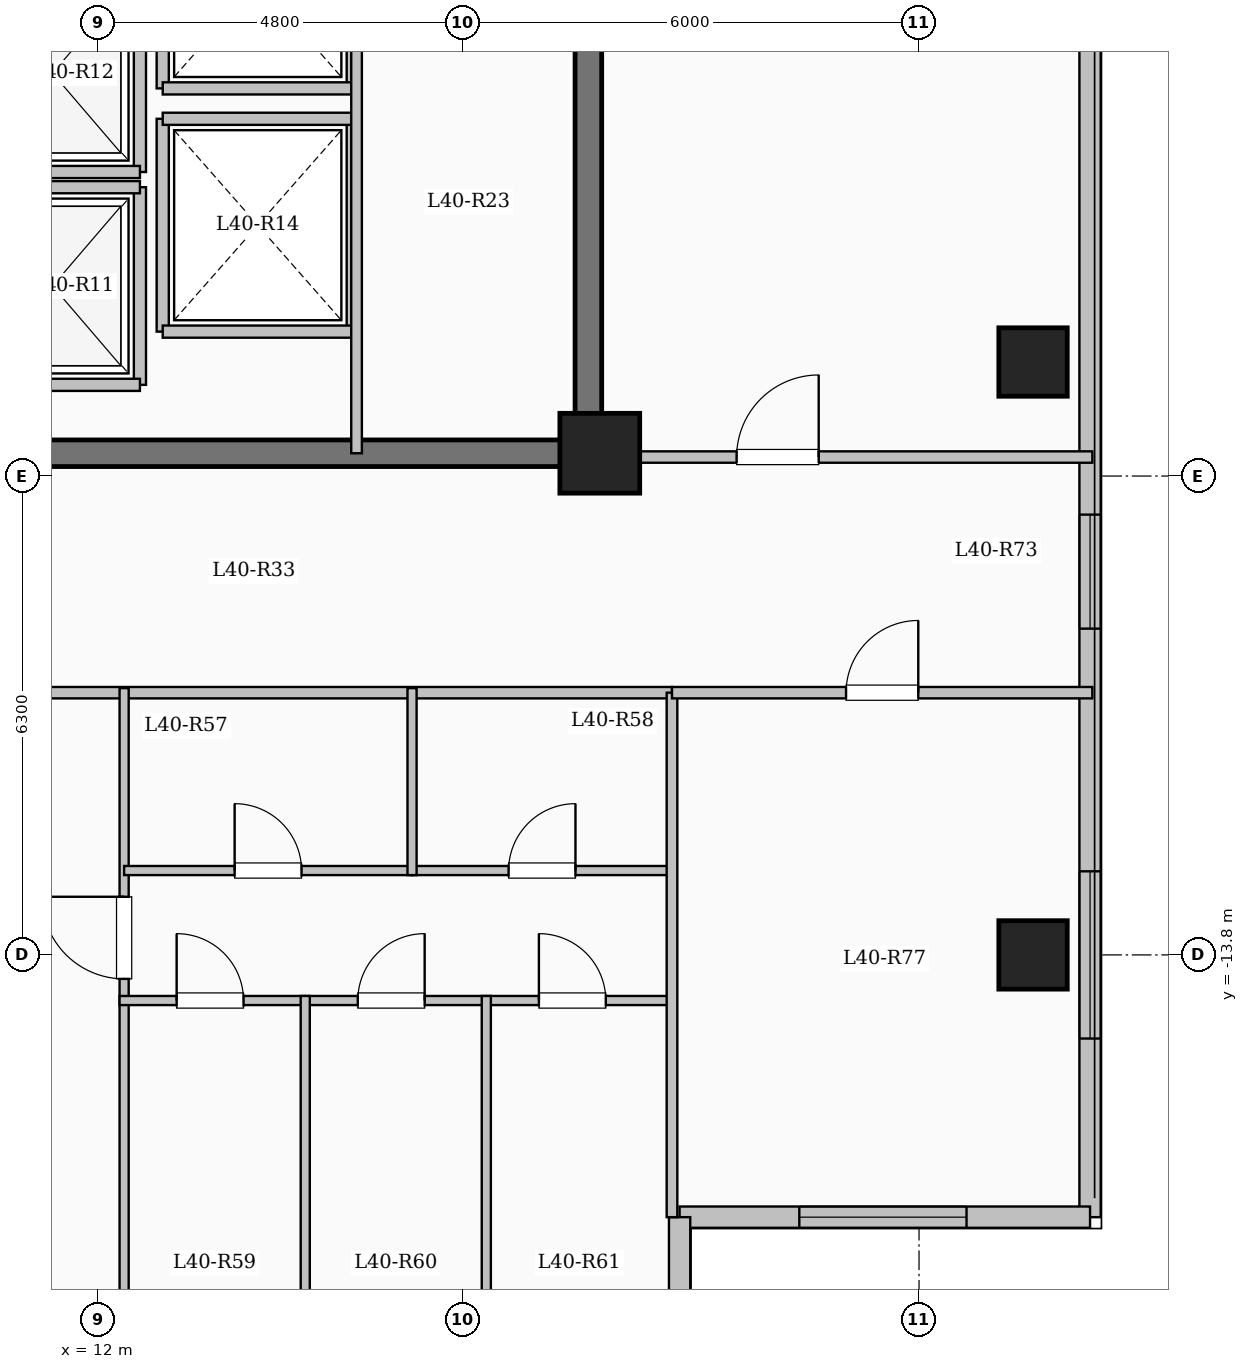
"""IFC4 building model, lengths in metres.
Left out: names, types, materials, properties, quantities, classifications, styles, units other than length and angle.
Written with IfcOpenShell. Run it as: python <this file> out.ifc"""

import sys

from ifc_helpers import new_model, si_unit, direction, frame, frame_2d, origin, origin_2d, place, context, subcontext, project, spatial, rectangle, extrude, element, fill, save


model = new_model("IFC4")
c1 = context("Model", 3, precision=1e-05, world=origin(), true_north=direction((0.0, 1.0)))
c2 = subcontext(c1, "Body", "Model", "MODEL_VIEW")
j1 = project(units=[si_unit("LENGTHUNIT", "METRE"), si_unit("PLANEANGLEUNIT", "RADIAN")], contexts=[c1])
p1 = place(None, origin())
s1 = spatial("IfcSite", under=j1, at=p1, CompositionType="ELEMENT")
p2 = place(p1, origin())
s2 = spatial("IfcBuilding", under=s1, at=p2, CompositionType="ELEMENT")
p3 = place(p2, frame((0.0, 0.0, 149.35)))
s3 = spatial("IfcBuildingStorey", under=s2, at=p3, CompositionType="ELEMENT", Elevation=149.35)
p4 = place(p3, frame((18.6, -7.2, 0.0), z_axis=(0.0, 0.0, 1.0), x_axis=(1.0, 0.0, 0.0)))
e1 = element("IfcColumn", 1, at=p4, inside=s3, PredefinedType="COLUMN", context=c2, shape_type="SweptSolid", body=[
    extrude(rectangle(XDim=1.05, YDim=1.05, at=origin_2d()), origin(), (0.0, 0.0, 1.0), 3.35),
])
for number, where, z_axis, x_axis in (
    (2, (24.3, -13.8, 0.0), (0.0, 0.0, 1.0), (1.0, 0.0, 0.0)),
    (3, (24.3, -6.0, 0.0), (0.0, 0.0, 1.0), (1.0, 0.0, 0.0)),
):
    element("IfcColumn", number, at=place(p3, frame(where, z_axis=z_axis, x_axis=x_axis)), inside=s3, PredefinedType="COLUMN", context=c2, shape_type="SweptSolid", body=[
        extrude(rectangle(XDim=0.9, YDim=0.9, at=origin_2d()), origin(), (0.0, 0.0, 1.0), 3.35),
    ])
p5 = place(p3, frame((25.05, 17.25, 0.0), z_axis=(0.0, 0.0, 1.0), x_axis=(0.0, -1.0, 0.0)))
e4 = element("IfcWall", 4, at=p5, inside=s3, PredefinedType="SOLIDWALL", context=c2, shape_type="SweptSolid", body=[
    extrude(rectangle(XDim=34.5, YDim=0.28, at=frame_2d((17.25, 0.0))), origin(), (0.0, 0.0, 1.0), 3.1),
])
p6 = place(p5, frame((1.375, 0.0, 0.9)))
e5 = element("IfcOpeningElement", 5, at=p6, cuts=e4, PredefinedType="OPENING", context=c2, shape_type="SweptSolid", body=[
    extrude(rectangle(XDim=2.0, YDim=1.7, at=frame_2d((1.0, 0.85))), frame((0.0, 0.15, 0.0), z_axis=(0.0, -1.0, 0.0), x_axis=(1.0, 0.0, 0.0)), (0.0, 0.0, 1.0), 0.3),
])
p7 = place(p5, frame((5.125, 0.0, 0.95)))
e6 = element("IfcOpeningElement", 6, at=p7, cuts=e4, PredefinedType="OPENING", context=c2, shape_type="SweptSolid", body=[
    extrude(rectangle(XDim=1.0, YDim=1.5, at=frame_2d((0.5, 0.75))), frame((0.0, 0.15, 0.0), z_axis=(0.0, -1.0, 0.0), x_axis=(1.0, 0.0, 0.0)), (0.0, 0.0, 1.0), 0.3),
])
p8 = place(p5, frame((14.5, 0.0, 0.9)))
e7 = element("IfcOpeningElement", 7, at=p8, cuts=e4, PredefinedType="OPENING", context=c2, shape_type="SweptSolid", body=[
    extrude(rectangle(XDim=2.0, YDim=1.7, at=frame_2d((1.0, 0.85))), frame((0.0, 0.15, 0.0), z_axis=(0.0, -1.0, 0.0), x_axis=(1.0, 0.0, 0.0)), (0.0, 0.0, 1.0), 0.3),
])
p9 = place(p5, frame((25.258, 0.0, 0.9)))
e8 = element("IfcOpeningElement", 8, at=p9, cuts=e4, PredefinedType="OPENING", context=c2, shape_type="SweptSolid", body=[
    extrude(rectangle(XDim=1.5, YDim=1.65, at=frame_2d((0.75, 0.825))), frame((0.0, 0.15, 0.0), z_axis=(0.0, -1.0, 0.0), x_axis=(1.0, 0.0, 0.0)), (0.0, 0.0, 1.0), 0.3),
])
p10 = place(p5, frame((29.95, 0.0, 0.9)))
e9 = element("IfcOpeningElement", 9, at=p10, cuts=e4, PredefinedType="OPENING", context=c2, shape_type="SweptSolid", body=[
    extrude(rectangle(XDim=2.2, YDim=1.75, at=frame_2d((1.1, 0.875))), frame((0.0, 0.15, 0.0), z_axis=(0.0, -1.0, 0.0), x_axis=(1.0, 0.0, 0.0)), (0.0, 0.0, 1.0), 0.3),
])
p11 = place(p3, frame((25.05, -17.25, 0.0), z_axis=(0.0, 0.0, 1.0), x_axis=(-1.0, 0.0, 0.0)))
e10 = element("IfcWall", 10, at=p11, inside=s3, PredefinedType="SOLIDWALL", context=c2, shape_type="SweptSolid", body=[
    extrude(rectangle(XDim=5.4, YDim=0.28, at=frame_2d((2.7, 0.0))), origin(), (0.0, 0.0, 1.0), 3.1),
])
p12 = place(p11, frame((1.625, 0.0, 0.9)))
e11 = element("IfcOpeningElement", 11, at=p12, cuts=e10, PredefinedType="OPENING", context=c2, shape_type="SweptSolid", body=[
    extrude(rectangle(XDim=2.2, YDim=1.75, at=frame_2d((1.1, 0.875))), frame((0.0, 0.15, 0.0), z_axis=(0.0, -1.0, 0.0), x_axis=(1.0, 0.0, 0.0)), (0.0, 0.0, 1.0), 0.3),
])
p13 = place(p3, frame((19.65, -17.25, 0.0), z_axis=(0.0, 0.0, 1.0), x_axis=(0.0, -1.0, 0.0)))
e12 = element("IfcWall", 12, at=p13, inside=s3, PredefinedType="SOLIDWALL", context=c2, shape_type="SweptSolid", body=[
    extrude(rectangle(XDim=3.9, YDim=0.28, at=frame_2d((1.95, 0.0))), origin(), (0.0, 0.0, 1.0), 3.1),
])
p14 = place(p13, frame((1.107, 0.0, 0.9)))
e13 = element("IfcOpeningElement", 13, at=p14, cuts=e12, PredefinedType="OPENING", context=c2, shape_type="SweptSolid", body=[
    extrude(rectangle(XDim=1.65, YDim=1.6, at=frame_2d((0.825, 0.8))), frame((0.0, 0.15, 0.0), z_axis=(0.0, -1.0, 0.0), x_axis=(1.0, 0.0, 0.0)), (0.0, 0.0, 1.0), 0.3),
])
p15 = place(p3, frame((12.55, -6.3, 0.0), z_axis=(0.0, 0.0, 1.0), x_axis=(0.0, 1.0, 0.0)))
e14 = element("IfcWall", 14, at=p15, inside=s3, PredefinedType="SOLIDWALL", context=c2, shape_type="SweptSolid", body=[
    extrude(rectangle(XDim=2.6, YDim=0.16, at=frame_2d((1.3, 0.0))), origin(), (0.0, 0.0, 1.0), 3.1),
])
for number, where, z_axis, x_axis in (
    (15, (10.25, -6.3, 0.0), (0.0, 0.0, 1.0), (1.0, 0.0, 0.0)),
    (16, (10.25, -3.7, 0.0), (0.0, 0.0, 1.0), (1.0, 0.0, 0.0)),
):
    element("IfcWall", number, at=place(p3, frame(where, z_axis=z_axis, x_axis=x_axis)), inside=s3, PredefinedType="SOLIDWALL", context=c2, shape_type="SweptSolid", body=[
        extrude(rectangle(XDim=2.3, YDim=0.16, at=frame_2d((1.15, 0.0))), origin(), (0.0, 0.0, 1.0), 3.1),
    ])
p16 = place(p3, frame((12.55, -3.5, 0.0), z_axis=(0.0, 0.0, 1.0), x_axis=(0.0, 1.0, 0.0)))
e17 = element("IfcWall", 17, at=p16, inside=s3, PredefinedType="SOLIDWALL", context=c2, shape_type="SweptSolid", body=[
    extrude(rectangle(XDim=2.6, YDim=0.16, at=frame_2d((1.3, 0.0))), origin(), (0.0, 0.0, 1.0), 3.1),
])
p17 = place(p3, frame((10.25, -3.5, 0.0), z_axis=(0.0, 0.0, 1.0), x_axis=(1.0, 0.0, 0.0)))
e18 = element("IfcWall", 18, at=p17, inside=s3, PredefinedType="SOLIDWALL", context=c2, shape_type="SweptSolid", body=[
    extrude(rectangle(XDim=2.3, YDim=0.16, at=frame_2d((1.15, 0.0))), origin(), (0.0, 0.0, 1.0), 3.1),
])
for number, where, z_axis, x_axis in (
    (19, (12.85, -5.6, 0.0), (0.0, 0.0, 1.0), (0.0, 1.0, 0.0)),
    (20, (15.35, -5.6, 0.0), (0.0, 0.0, 1.0), (0.0, 1.0, 0.0)),
):
    element("IfcWall", number, at=place(p3, frame(where, z_axis=z_axis, x_axis=x_axis)), inside=s3, PredefinedType="SOLIDWALL", context=c2, shape_type="SweptSolid", body=[
        extrude(rectangle(XDim=2.8, YDim=0.16, at=frame_2d((1.4, 0.0))), origin(), (0.0, 0.0, 1.0), 3.1),
    ])
for number, where, z_axis, x_axis in (
    (21, (12.85, -5.6, 0.0), (0.0, 0.0, 1.0), (1.0, 0.0, 0.0)),
    (22, (12.85, -2.8, 0.0), (0.0, 0.0, 1.0), (1.0, 0.0, 0.0)),
):
    element("IfcWall", number, at=place(p3, frame(where, z_axis=z_axis, x_axis=x_axis)), inside=s3, PredefinedType="SOLIDWALL", context=c2, shape_type="SweptSolid", body=[
        extrude(rectangle(XDim=2.5, YDim=0.16, at=frame_2d((1.25, 0.0))), origin(), (0.0, 0.0, 1.0), 3.1),
    ])
for number, where, z_axis, x_axis in (
    (23, (12.85, -2.4, 0.0), (0.0, 0.0, 1.0), (0.0, 1.0, 0.0)),
    (24, (15.35, -2.4, 0.0), (0.0, 0.0, 1.0), (0.0, 1.0, 0.0)),
):
    element("IfcWall", number, at=place(p3, frame(where, z_axis=z_axis, x_axis=x_axis)), inside=s3, PredefinedType="SOLIDWALL", context=c2, shape_type="SweptSolid", body=[
        extrude(rectangle(XDim=2.8, YDim=0.16, at=frame_2d((1.4, 0.0))), origin(), (0.0, 0.0, 1.0), 3.1),
    ])
p18 = place(p3, frame((12.85, -2.4, 0.0), z_axis=(0.0, 0.0, 1.0), x_axis=(1.0, 0.0, 0.0)))
e25 = element("IfcWall", 25, at=p18, inside=s3, PredefinedType="SOLIDWALL", context=c2, shape_type="SweptSolid", body=[
    extrude(rectangle(XDim=2.5, YDim=0.16, at=frame_2d((1.25, 0.0))), origin(), (0.0, 0.0, 1.0), 3.1),
])
p19 = place(p3, frame((18.45, -7.375, 0.0), z_axis=(0.0, 0.0, 1.0), x_axis=(0.0, 1.0, 0.0)))
e26 = element("IfcWall", 26, at=p19, inside=s3, PredefinedType="SHEAR", context=c2, shape_type="SweptSolid", body=[
    extrude(rectangle(XDim=14.05, YDim=0.35, at=frame_2d((7.025, 0.0))), origin(), (0.0, 0.0, 1.0), 3.35),
])
p20 = place(p3, frame((10.075, -7.2, 0.0), z_axis=(0.0, 0.0, 1.0), x_axis=(1.0, 0.0, 0.0)))
e27 = element("IfcWall", 27, at=p20, inside=s3, PredefinedType="SHEAR", context=c2, shape_type="SweptSolid", body=[
    extrude(rectangle(XDim=8.55, YDim=0.35, at=frame_2d((4.275, 0.0))), origin(), (0.0, 0.0, 1.0), 3.35),
])
p21 = place(p3, frame((15.4, -7.2, 0.0), z_axis=(0.0, 0.0, 1.0), x_axis=(0.0, 1.0, 0.0)))
e28 = element("IfcWall", 28, at=p21, inside=s3, PredefinedType="PARTITIONING", context=c2, shape_type="SweptSolid", body=[
    extrude(rectangle(XDim=10.45, YDim=0.14, at=frame_2d((5.225, 0.0))), origin(), (0.0, 0.0, 1.0), 3.1),
])
p22 = place(p21, frame((9.25, 0.0, 0.0)))
e29 = element("IfcOpeningElement", 29, at=p22, cuts=e28, PredefinedType="OPENING", context=c2, shape_type="SweptSolid", body=[
    extrude(rectangle(XDim=0.9, YDim=2.08, at=frame_2d((0.45, 1.04))), frame((0.0, 0.08, 0.0), z_axis=(0.0, -1.0, 0.0), x_axis=(1.0, 0.0, 0.0)), (0.0, 0.0, 1.0), 0.16),
])
p23 = place(p3, frame((8.55, -10.35, 0.0), z_axis=(0.0, 0.0, 1.0), x_axis=(1.0, 0.0, 0.0)))
e30 = element("IfcWall", 30, at=p23, inside=s3, PredefinedType="PARTITIONING", context=c2, shape_type="SweptSolid", body=[
    extrude(rectangle(XDim=11.0, YDim=0.15, at=frame_2d((5.5, 0.0))), origin(), (0.0, 0.0, 1.0), 3.1),
])
p24 = place(p23, frame((0.75, 0.0, 0.0)))
e31 = element("IfcOpeningElement", 31, at=p24, cuts=e30, PredefinedType="OPENING", context=c2, shape_type="SweptSolid", body=[
    extrude(rectangle(XDim=0.96, YDim=2.15, at=frame_2d((0.48, 1.075))), frame((0.0, 0.085, 0.0), z_axis=(0.0, -1.0, 0.0), x_axis=(1.0, 0.0, 0.0)), (0.0, 0.0, 1.0), 0.17),
])
p25 = place(p3, frame((12.342, -21.2, 0.0), z_axis=(0.0, 0.0, 1.0), x_axis=(0.0, 1.0, 0.0)))
e32 = element("IfcWall", 32, at=p25, inside=s3, PredefinedType="PARTITIONING", context=c2, shape_type="SweptSolid", body=[
    extrude(rectangle(XDim=10.91, YDim=0.12, at=frame_2d((5.455, 0.0))), origin(), (0.0, 0.0, 1.0), 3.1),
])
p26 = place(p25, frame((7.085, 0.0, 0.0)))
e33 = element("IfcOpeningElement", 33, at=p26, cuts=e32, PredefinedType="OPENING", context=c2, shape_type="SweptSolid", body=[
    extrude(rectangle(XDim=1.08, YDim=2.15, at=frame_2d((0.54, 1.075))), frame((0.0, 0.07, 0.0), z_axis=(0.0, -1.0, 0.0), x_axis=(1.0, 0.0, 0.0)), (0.0, 0.0, 1.0), 0.14),
])
p27 = place(p3, frame((12.342, -12.69, 0.0), z_axis=(0.0, 0.0, 1.0), x_axis=(1.0, 0.0, 0.0)))
e34 = element("IfcWall", 34, at=p27, inside=s3, PredefinedType="PARTITIONING", context=c2, shape_type="SweptSolid", body=[
    extrude(rectangle(XDim=3.788, YDim=0.12, at=frame_2d((1.894, 0.0))), origin(), (0.0, 0.0, 1.0), 3.1),
])
p28 = place(p27, frame((1.454, 0.0, 0.0)))
e35 = element("IfcOpeningElement", 35, at=p28, cuts=e34, PredefinedType="OPENING", context=c2, shape_type="SweptSolid", body=[
    extrude(rectangle(XDim=0.88, YDim=2.1, at=frame_2d((0.44, 1.05))), frame((0.0, 0.07, 0.0), z_axis=(0.0, -1.0, 0.0), x_axis=(1.0, 0.0, 0.0)), (0.0, 0.0, 1.0), 0.14),
])
p29 = place(p3, frame((16.13, -12.69, 0.0), z_axis=(0.0, 0.0, 1.0), x_axis=(1.0, 0.0, 0.0)))
e36 = element("IfcWall", 36, at=p29, inside=s3, PredefinedType="PARTITIONING", context=c2, shape_type="SweptSolid", body=[
    extrude(rectangle(XDim=3.42, YDim=0.12, at=frame_2d((1.71, 0.0))), origin(), (0.0, 0.0, 1.0), 3.1),
])
p30 = place(p29, frame((1.27, 0.0, 0.0)))
e37 = element("IfcOpeningElement", 37, at=p30, cuts=e36, PredefinedType="OPENING", context=c2, shape_type="SweptSolid", body=[
    extrude(rectangle(XDim=0.88, YDim=2.1, at=frame_2d((0.44, 1.05))), frame((0.0, 0.07, 0.0), z_axis=(0.0, -1.0, 0.0), x_axis=(1.0, 0.0, 0.0)), (0.0, 0.0, 1.0), 0.14),
])
p31 = place(p3, frame((12.282, -14.4, 0.0), z_axis=(0.0, 0.0, 1.0), x_axis=(1.0, 0.0, 0.0)))
e38 = element("IfcWall", 38, at=p31, inside=s3, PredefinedType="PARTITIONING", context=c2, shape_type="SweptSolid", body=[
    extrude(rectangle(XDim=7.328, YDim=0.12, at=frame_2d((3.664, 0.0))), origin(), (0.0, 0.0, 1.0), 3.1),
])
p32 = place(p31, frame((0.751, 0.0, 0.0)))
e39 = element("IfcOpeningElement", 39, at=p32, cuts=e38, PredefinedType="OPENING", context=c2, shape_type="SweptSolid", body=[
    extrude(rectangle(XDim=0.88, YDim=2.1, at=frame_2d((0.44, 1.05))), frame((0.0, 0.07, 0.0), z_axis=(0.0, -1.0, 0.0), x_axis=(1.0, 0.0, 0.0)), (0.0, 0.0, 1.0), 0.14),
])
p33 = place(p31, frame((3.134, 0.0, 0.0)))
e40 = element("IfcOpeningElement", 40, at=p33, cuts=e38, PredefinedType="OPENING", context=c2, shape_type="SweptSolid", body=[
    extrude(rectangle(XDim=0.88, YDim=2.1, at=frame_2d((0.44, 1.05))), frame((0.0, 0.07, 0.0), z_axis=(0.0, -1.0, 0.0), x_axis=(1.0, 0.0, 0.0)), (0.0, 0.0, 1.0), 0.14),
])
p34 = place(p31, frame((5.517, 0.0, 0.0)))
e41 = element("IfcOpeningElement", 41, at=p34, cuts=e38, PredefinedType="OPENING", context=c2, shape_type="SweptSolid", body=[
    extrude(rectangle(XDim=0.88, YDim=2.1, at=frame_2d((0.44, 1.05))), frame((0.0, 0.07, 0.0), z_axis=(0.0, -1.0, 0.0), x_axis=(1.0, 0.0, 0.0)), (0.0, 0.0, 1.0), 0.14),
])
p35 = place(p3, frame((16.13, -12.75, 0.0), z_axis=(0.0, 0.0, 1.0), x_axis=(0.0, 1.0, 0.0)))
e42 = element("IfcWall", 42, at=p35, inside=s3, PredefinedType="PARTITIONING", context=c2, shape_type="SweptSolid", body=[
    extrude(rectangle(XDim=2.46, YDim=0.12, at=frame_2d((1.23, 0.0))), origin(), (0.0, 0.0, 1.0), 3.1),
])
p36 = place(p3, frame((14.725, -21.2, 0.0), z_axis=(0.0, 0.0, 1.0), x_axis=(0.0, 1.0, 0.0)))
e43 = element("IfcWall", 43, at=p36, inside=s3, PredefinedType="PARTITIONING", context=c2, shape_type="SweptSolid", body=[
    extrude(rectangle(XDim=6.86, YDim=0.12, at=frame_2d((3.43, 0.0))), origin(), (0.0, 0.0, 1.0), 2.585),
])
p37 = place(p3, frame((17.107, -21.2, 0.0), z_axis=(0.0, 0.0, 1.0), x_axis=(0.0, 1.0, 0.0)))
e44 = element("IfcWall", 44, at=p37, inside=s3, PredefinedType="PARTITIONING", context=c2, shape_type="SweptSolid", body=[
    extrude(rectangle(XDim=6.86, YDim=0.12, at=frame_2d((3.43, 0.0))), origin(), (0.0, 0.0, 1.0), 3.1),
])
p38 = place(p3, frame((18.45, -7.25, 0.0), z_axis=(0.0, 0.0, 1.0), x_axis=(1.0, 0.0, 0.0)))
e45 = element("IfcWall", 45, at=p38, inside=s3, PredefinedType="PARTITIONING", context=c2, shape_type="SweptSolid", body=[
    extrude(rectangle(XDim=6.63, YDim=0.15, at=frame_2d((3.315, 0.0))), origin(), (0.0, 0.0, 1.0), 3.1),
])
p39 = place(p38, frame((1.95, 0.0, 0.0)))
e46 = element("IfcOpeningElement", 46, at=p39, cuts=e45, PredefinedType="OPENING", context=c2, shape_type="SweptSolid", body=[
    extrude(rectangle(XDim=1.08, YDim=2.15, at=frame_2d((0.54, 1.075))), frame((0.0, 0.085, 0.0), z_axis=(0.0, -1.0, 0.0), x_axis=(1.0, 0.0, 0.0)), (0.0, 0.0, 1.0), 0.17),
])
p40 = place(p3, frame((19.55, -17.25, 0.0), z_axis=(0.0, 0.0, 1.0), x_axis=(0.0, 1.0, 0.0)))
e47 = element("IfcWall", 47, at=p40, inside=s3, PredefinedType="PARTITIONING", context=c2, shape_type="SweptSolid", body=[
    extrude(rectangle(XDim=6.9, YDim=0.14, at=frame_2d((3.45, 0.0))), origin(), (0.0, 0.0, 1.0), 3.1),
])
p41 = place(p3, frame((19.55, -10.35, 0.0), z_axis=(0.0, 0.0, 1.0), x_axis=(1.0, 0.0, 0.0)))
e48 = element("IfcWall", 48, at=p41, inside=s3, PredefinedType="PARTITIONING", context=c2, shape_type="SweptSolid", body=[
    extrude(rectangle(XDim=5.53, YDim=0.15, at=frame_2d((2.765, 0.0))), origin(), (0.0, 0.0, 1.0), 3.1),
])
p42 = place(p41, frame((2.29, 0.0, 0.0)))
e49 = element("IfcOpeningElement", 49, at=p42, cuts=e48, PredefinedType="OPENING", context=c2, shape_type="SweptSolid", body=[
    extrude(rectangle(XDim=0.95, YDim=2.15, at=frame_2d((0.475, 1.075))), frame((0.0, 0.085, 0.0), z_axis=(0.0, -1.0, 0.0), x_axis=(1.0, 0.0, 0.0)), (0.0, 0.0, 1.0), 0.17),
])
p43 = place(p9, origin())
e50 = element("IfcWindow", 50, at=p43, inside=s3, PartitioningType="SINGLE_PANEL", PredefinedType="WINDOW", context=c2, shape_type="SweptSolid", body=[
    extrude(rectangle(XDim=1.5, YDim=1.65, at=frame_2d((0.75, 0.825))), frame((0.0, 0.03, 0.0), z_axis=(0.0, -1.0, 0.0), x_axis=(1.0, 0.0, 0.0)), (0.0, 0.0, 1.0), 0.06),
])
fill(e8, e50)
p44 = place(p10, origin())
e51 = element("IfcWindow", 51, at=p44, inside=s3, PartitioningType="SINGLE_PANEL", PredefinedType="WINDOW", context=c2, shape_type="SweptSolid", body=[
    extrude(rectangle(XDim=2.2, YDim=1.75, at=frame_2d((1.1, 0.875))), frame((0.0, 0.03, 0.0), z_axis=(0.0, -1.0, 0.0), x_axis=(1.0, 0.0, 0.0)), (0.0, 0.0, 1.0), 0.06),
])
fill(e9, e51)
p45 = place(p12, origin())
e52 = element("IfcWindow", 52, at=p45, inside=s3, PartitioningType="SINGLE_PANEL", PredefinedType="WINDOW", context=c2, shape_type="SweptSolid", body=[
    extrude(rectangle(XDim=2.2, YDim=1.75, at=frame_2d((1.1, 0.875))), frame((0.0, 0.03, 0.0), z_axis=(0.0, -1.0, 0.0), x_axis=(1.0, 0.0, 0.0)), (0.0, 0.0, 1.0), 0.06),
])
fill(e11, e52)
p46 = place(p26, origin())
e53 = element("IfcDoor", 53, at=p46, inside=s3, OperationType="SINGLE_SWING_RIGHT", PredefinedType="DOOR", context=c2, shape_type="SweptSolid", body=[
    extrude(rectangle(XDim=1.08, YDim=2.15, at=frame_2d((0.54, 1.075))), frame((0.0, 0.025, 0.0), z_axis=(0.0, -1.0, 0.0), x_axis=(1.0, 0.0, 0.0)), (0.0, 0.0, 1.0), 0.05),
])
fill(e33, e53)
p47 = place(p28, origin())
e54 = element("IfcDoor", 54, at=p47, inside=s3, OperationType="SINGLE_SWING_LEFT", PredefinedType="DOOR", context=c2, shape_type="SweptSolid", body=[
    extrude(rectangle(XDim=0.88, YDim=2.1, at=frame_2d((0.44, 1.05))), frame((0.0, 0.025, 0.0), z_axis=(0.0, -1.0, 0.0), x_axis=(1.0, 0.0, 0.0)), (0.0, 0.0, 1.0), 0.05),
])
fill(e35, e54)
p48 = place(p30, origin())
e55 = element("IfcDoor", 55, at=p48, inside=s3, OperationType="SINGLE_SWING_RIGHT", PredefinedType="DOOR", context=c2, shape_type="SweptSolid", body=[
    extrude(rectangle(XDim=0.88, YDim=2.1, at=frame_2d((0.44, 1.05))), frame((0.0, 0.025, 0.0), z_axis=(0.0, -1.0, 0.0), x_axis=(1.0, 0.0, 0.0)), (0.0, 0.0, 1.0), 0.05),
])
fill(e37, e55)
p49 = place(p32, origin())
e56 = element("IfcDoor", 56, at=p49, inside=s3, OperationType="SINGLE_SWING_LEFT", PredefinedType="DOOR", context=c2, shape_type="SweptSolid", body=[
    extrude(rectangle(XDim=0.88, YDim=2.1, at=frame_2d((0.44, 1.05))), frame((0.0, 0.025, 0.0), z_axis=(0.0, -1.0, 0.0), x_axis=(1.0, 0.0, 0.0)), (0.0, 0.0, 1.0), 0.05),
])
fill(e39, e56)
p50 = place(p33, origin())
e57 = element("IfcDoor", 57, at=p50, inside=s3, OperationType="SINGLE_SWING_RIGHT", PredefinedType="DOOR", context=c2, shape_type="SweptSolid", body=[
    extrude(rectangle(XDim=0.88, YDim=2.1, at=frame_2d((0.44, 1.05))), frame((0.0, 0.025, 0.0), z_axis=(0.0, -1.0, 0.0), x_axis=(1.0, 0.0, 0.0)), (0.0, 0.0, 1.0), 0.05),
])
fill(e40, e57)
p51 = place(p34, origin())
e58 = element("IfcDoor", 58, at=p51, inside=s3, OperationType="SINGLE_SWING_LEFT", PredefinedType="DOOR", context=c2, shape_type="SweptSolid", body=[
    extrude(rectangle(XDim=0.88, YDim=2.1, at=frame_2d((0.44, 1.05))), frame((0.0, 0.025, 0.0), z_axis=(0.0, -1.0, 0.0), x_axis=(1.0, 0.0, 0.0)), (0.0, 0.0, 1.0), 0.05),
])
fill(e41, e58)
p52 = place(p42, origin())
e59 = element("IfcDoor", 59, at=p52, inside=s3, OperationType="SINGLE_SWING_RIGHT", PredefinedType="DOOR", context=c2, shape_type="SweptSolid", body=[
    extrude(rectangle(XDim=0.95, YDim=2.15, at=frame_2d((0.475, 1.075))), frame((0.0, 0.025, 0.0), z_axis=(0.0, -1.0, 0.0), x_axis=(1.0, 0.0, 0.0)), (0.0, 0.0, 1.0), 0.05),
])
fill(e49, e59)
p53 = place(p39, origin())
e60 = element("IfcDoor", 60, at=p53, inside=s3, OperationType="SINGLE_SWING_RIGHT", PredefinedType="DOOR", context=c2, shape_type="SweptSolid", body=[
    extrude(rectangle(XDim=1.08, YDim=2.15, at=frame_2d((0.54, 1.075))), frame((0.0, 0.025, 0.0), z_axis=(0.0, -1.0, 0.0), x_axis=(1.0, 0.0, 0.0)), (0.0, 0.0, 1.0), 0.05),
])
fill(e46, e60)
save(model, sys.argv[1])
